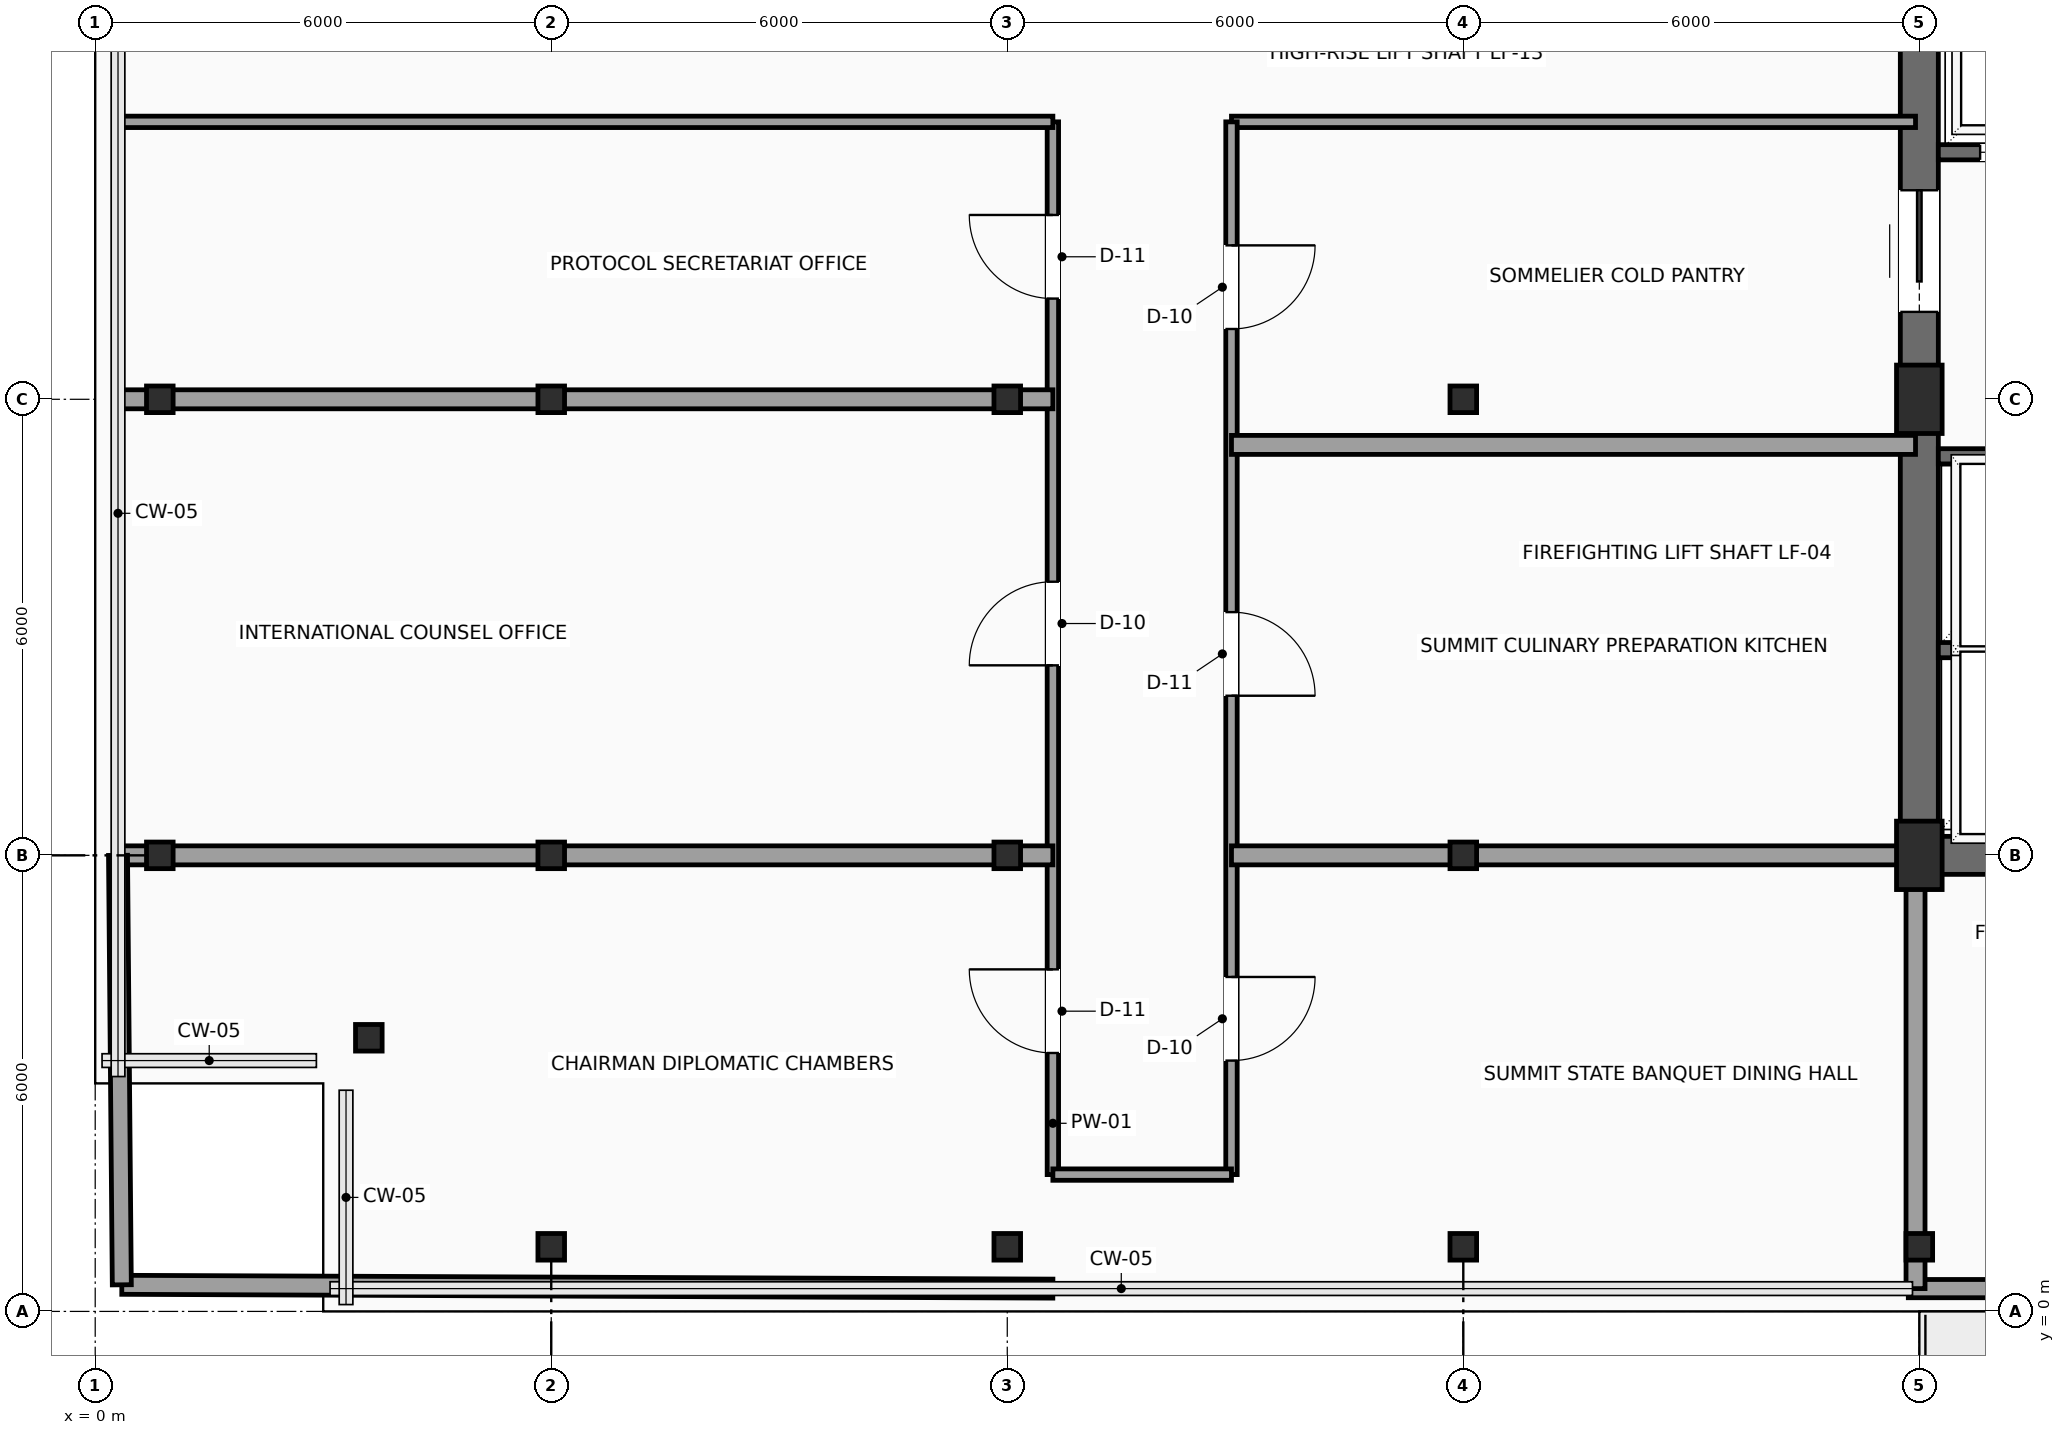
"""IFC4 building model, lengths in metres.
Left out: names, types, materials, properties, quantities, classifications, styles, units other than length and angle.
Written with IfcOpenShell. Run it as: python <this file> out.ifc"""

import sys

from ifc_helpers import new_model, si_unit, direction, frame, frame_2d, origin, origin_2d, place, context, subcontext, project, spatial, rectangle, hollow_rectangle, extrude, element, fill, save


model = new_model("IFC4")
c1 = context("Model", 3, precision=1e-05, world=origin(), true_north=direction((0.0, 1.0)))
c2 = subcontext(c1, "Body", "Model", "MODEL_VIEW")
j1 = project(units=[si_unit("LENGTHUNIT", "METRE"), si_unit("PLANEANGLEUNIT", "RADIAN")], contexts=[c1])
p1 = place(None, origin())
s1 = spatial("IfcSite", under=j1, at=p1, CompositionType="ELEMENT")
p2 = place(p1, origin())
s2 = spatial("IfcBuilding", under=s1, at=p2, CompositionType="ELEMENT")
p3 = place(p2, frame((0.0, 0.0, 285.2)))
s3 = spatial("IfcBuildingStorey", under=s2, at=p3, CompositionType="ELEMENT", Elevation=285.2)
for number, where, z_axis, x_axis in (
    (1, (24.0, 6.0, 0.0), (0.0, 0.0, 1.0), (1.0, 0.0, 0.0)),
    (2, (24.0, 12.0, 0.0), (0.0, 0.0, 1.0), (1.0, 0.0, 0.0)),
):
    element("IfcColumn", number, at=place(p3, frame(where, z_axis=z_axis, x_axis=x_axis)), inside=s3, PredefinedType="COLUMN", context=c2, shape_type="SweptSolid", body=[
        extrude(rectangle(XDim=0.6, YDim=0.9, at=origin_2d()), origin(), (0.0, 0.0, 1.0), 3.5),
    ])
for number, where, z_axis, x_axis in (
    (3, (3.6, 3.6, 0.0), (0.0, 0.0, 1.0), (1.0, 0.0, 0.0)),
    (4, (0.85, 6.0, 0.0), (0.0, 0.0, 1.0), (1.0, 0.0, 0.0)),
    (5, (0.85, 12.0, 0.0), (0.0, 0.0, 1.0), (1.0, 0.0, 0.0)),
    (6, (6.0, 0.85, 0.0), (0.0, 0.0, 1.0), (1.0, 0.0, 0.0)),
    (7, (6.0, 6.0, 0.0), (0.0, 0.0, 1.0), (1.0, 0.0, 0.0)),
    (8, (6.0, 12.0, 0.0), (0.0, 0.0, 1.0), (1.0, 0.0, 0.0)),
    (9, (12.0, 0.85, 0.0), (0.0, 0.0, 1.0), (1.0, 0.0, 0.0)),
    (10, (12.0, 6.0, 0.0), (0.0, 0.0, 1.0), (1.0, 0.0, 0.0)),
    (11, (12.0, 12.0, 0.0), (0.0, 0.0, 1.0), (1.0, 0.0, 0.0)),
    (12, (18.0, 0.85, 0.0), (0.0, 0.0, 1.0), (1.0, 0.0, 0.0)),
    (13, (18.0, 6.0, 0.0), (0.0, 0.0, 1.0), (1.0, 0.0, 0.0)),
    (14, (18.0, 12.0, 0.0), (0.0, 0.0, 1.0), (1.0, 0.0, 0.0)),
    (15, (24.0, 0.85, 0.0), (0.0, 0.0, 1.0), (1.0, 0.0, 0.0)),
):
    element("IfcColumn", number, at=place(p3, frame(where, z_axis=z_axis, x_axis=x_axis)), inside=s3, PredefinedType="COLUMN", context=c2, shape_type="SweptSolid", body=[
        extrude(hollow_rectangle(XDim=0.35, YDim=0.35, WallThickness=0.016, InnerFilletRadius=0.016, OuterFilletRadius=0.032, at=origin_2d()), origin(), (0.0, 0.0, 1.0), 3.5),
    ])
p4 = place(p3, frame((33.145, 0.3, 0.0), z_axis=(0.0, 0.0, 1.0), x_axis=(-1.0, 0.0, 0.0)))
e16 = element("IfcWall", 16, at=p4, inside=s3, PredefinedType="SOLIDWALL", context=c2, shape_type="SweptSolid", body=[
    extrude(rectangle(XDim=9.29, YDim=0.24, at=frame_2d((4.645, 0.0))), origin(), (0.0, 0.0, 1.0), 3.3),
])
p5 = place(p4, frame((3.945, 0.0, 0.0)))
e17 = element("IfcOpeningElement", 17, at=p5, cuts=e16, PredefinedType="OPENING", context=c2, shape_type="SweptSolid", body=[
    extrude(rectangle(XDim=1.05, YDim=2.2, at=frame_2d((0.525, 1.1))), frame((0.0, 0.13, 0.0), z_axis=(0.0, -1.0, 0.0), x_axis=(1.0, 0.0, 0.0)), (0.0, 0.0, 1.0), 0.26),
])
p6 = place(p4, frame((5.345, 0.0, 0.6)))
e18 = element("IfcOpeningElement", 18, at=p6, cuts=e16, PredefinedType="OPENING", context=c2, shape_type="SweptSolid", body=[
    extrude(rectangle(XDim=2.7, YDim=2.3, at=frame_2d((1.35, 1.15))), frame((0.0, 0.13, 0.0), z_axis=(0.0, -1.0, 0.0), x_axis=(1.0, 0.0, 0.0)), (0.0, 0.0, 1.0), 0.26),
])
p7 = place(p4, frame((1.4, 0.0, 0.6)))
e19 = element("IfcOpeningElement", 19, at=p7, cuts=e16, PredefinedType="OPENING", context=c2, shape_type="SweptSolid", body=[
    extrude(rectangle(XDim=0.9, YDim=2.2, at=frame_2d((0.45, 1.1))), frame((0.0, 0.13, 0.0), z_axis=(0.0, -1.0, 0.0), x_axis=(1.0, 0.0, 0.0)), (0.0, 0.0, 1.0), 0.26),
])
p8 = place(p3, frame((24.0, 6.0, 0.0), z_axis=(0.0, 0.0, 1.0), x_axis=(1.0, 0.0, 0.0)))
e20 = element("IfcWall", 20, at=p8, inside=s3, PredefinedType="SHEAR", context=c2, shape_type="SweptSolid", body=[
    extrude(rectangle(XDim=9.6, YDim=0.5, at=frame_2d((4.8, 0.0))), origin(), (0.0, 0.0, 1.0), 3.3),
])
p9 = place(p3, frame((24.0, 6.0, 0.0), z_axis=(0.0, 0.0, 1.0), x_axis=(0.0, 1.0, 0.0)))
e21 = element("IfcWall", 21, at=p9, inside=s3, PredefinedType="SHEAR", context=c2, shape_type="SweptSolid", body=[
    extrude(rectangle(XDim=12.0, YDim=0.5, at=frame_2d((6.0, 0.0))), origin(), (0.0, 0.0, 1.0), 3.3),
])
p10 = place(p9, frame((7.15, 0.0, 0.0)))
e22 = element("IfcOpeningElement", 22, at=p10, cuts=e21, PredefinedType="OPENING", context=c2, shape_type="SweptSolid", body=[
    extrude(rectangle(XDim=1.6, YDim=2.3, at=frame_2d((0.8, 1.15))), frame((0.0, 0.26, 0.0), z_axis=(0.0, -1.0, 0.0), x_axis=(1.0, 0.0, 0.0)), (0.0, 0.0, 1.0), 0.52),
])
for number, where, z_axis, x_axis in (
    (23, (24.25, 8.7, 0.0), (0.0, 0.0, 1.0), (1.0, 0.0, 0.0)),
    (24, (24.25, 11.25, 0.0), (0.0, 0.0, 1.0), (1.0, 0.0, 0.0)),
):
    element("IfcWall", number, at=place(p3, frame(where, z_axis=z_axis, x_axis=x_axis)), inside=s3, PredefinedType="SHEAR", context=c2, shape_type="SweptSolid", body=[
        extrude(rectangle(XDim=2.17, YDim=0.2, at=frame_2d((1.085, 0.0))), origin(), (0.0, 0.0, 1.0), 3.3),
    ])
p11 = place(p3, frame((24.25, 15.25, 0.0), z_axis=(0.0, 0.0, 1.0), x_axis=(1.0, 0.0, 0.0)))
e25 = element("IfcWall", 25, at=p11, inside=s3, PredefinedType="SHEAR", context=c2, shape_type="SweptSolid", body=[
    extrude(rectangle(XDim=5.2, YDim=0.2, at=frame_2d((2.6, 0.0))), origin(), (0.0, 0.0, 1.0), 3.3),
])
p12 = place(p11, frame((0.55, 0.0, 0.0)))
e26 = element("IfcOpeningElement", 26, at=p12, cuts=e25, PredefinedType="OPENING", context=c2, shape_type="SweptSolid", body=[
    extrude(rectangle(XDim=1.2, YDim=2.2, at=frame_2d((0.6, 1.1))), frame((0.0, 0.11, 0.0), z_axis=(0.0, -1.0, 0.0), x_axis=(1.0, 0.0, 0.0)), (0.0, 0.0, 1.0), 0.22),
])
p13 = place(p11, frame((3.15, 0.0, 0.0)))
e27 = element("IfcOpeningElement", 27, at=p13, cuts=e25, PredefinedType="OPENING", context=c2, shape_type="SweptSolid", body=[
    extrude(rectangle(XDim=1.2, YDim=2.2, at=frame_2d((0.6, 1.1))), frame((0.0, 0.11, 0.0), z_axis=(0.0, -1.0, 0.0), x_axis=(1.0, 0.0, 0.0)), (0.0, 0.0, 1.0), 0.22),
])
p14 = place(p3, frame((12.6, 1.8, 0.0), z_axis=(0.0, 0.0, 1.0), x_axis=(0.0, 1.0, 0.0)))
e28 = element("IfcWall", 28, at=p14, inside=s3, PredefinedType="PARTITIONING", context=c2, shape_type="SweptSolid", body=[
    extrude(rectangle(XDim=13.85, YDim=0.15, at=frame_2d((6.925, 0.0))), origin(), (0.0, 0.0, 1.0), 3.3),
])
p15 = place(p14, frame((1.6, 0.0, 0.0)))
e29 = element("IfcOpeningElement", 29, at=p15, cuts=e28, PredefinedType="OPENING", context=c2, shape_type="SweptSolid", body=[
    extrude(rectangle(XDim=1.1, YDim=2.25, at=frame_2d((0.55, 1.125))), frame((0.0, 0.085, 0.0), z_axis=(0.0, -1.0, 0.0), x_axis=(1.0, 0.0, 0.0)), (0.0, 0.0, 1.0), 0.17),
])
p16 = place(p14, frame((6.7, 0.0, 0.0)))
e30 = element("IfcOpeningElement", 30, at=p16, cuts=e28, PredefinedType="OPENING", context=c2, shape_type="SweptSolid", body=[
    extrude(rectangle(XDim=1.1, YDim=2.25, at=frame_2d((0.55, 1.125))), frame((0.0, 0.085, 0.0), z_axis=(0.0, -1.0, 0.0), x_axis=(1.0, 0.0, 0.0)), (0.0, 0.0, 1.0), 0.17),
])
p17 = place(p14, frame((11.525, 0.0, 0.0)))
e31 = element("IfcOpeningElement", 31, at=p17, cuts=e28, PredefinedType="OPENING", context=c2, shape_type="SweptSolid", body=[
    extrude(rectangle(XDim=1.1, YDim=2.25, at=frame_2d((0.55, 1.125))), frame((0.0, 0.085, 0.0), z_axis=(0.0, -1.0, 0.0), x_axis=(1.0, 0.0, 0.0)), (0.0, 0.0, 1.0), 0.17),
])
p18 = place(p3, frame((12.6, 15.65, 0.0), z_axis=(0.0, 0.0, 1.0), x_axis=(-1.0, 0.0, 0.0)))
e32 = element("IfcWall", 32, at=p18, inside=s3, PredefinedType="PARTITIONING", context=c2, shape_type="SweptSolid", body=[
    extrude(rectangle(XDim=12.3, YDim=0.15, at=frame_2d((6.15, 0.0))), origin(), (0.0, 0.0, 1.0), 3.3),
])
p19 = place(p3, frame((23.95, 15.65, 0.0), z_axis=(0.0, 0.0, 1.0), x_axis=(-1.0, 0.0, 0.0)))
e33 = element("IfcWall", 33, at=p19, inside=s3, PredefinedType="PARTITIONING", context=c2, shape_type="SweptSolid", body=[
    extrude(rectangle(XDim=9.0, YDim=0.15, at=frame_2d((4.5, 0.0))), origin(), (0.0, 0.0, 1.0), 3.3),
])
p20 = place(p3, frame((14.95, 15.65, 0.0), z_axis=(0.0, 0.0, 1.0), x_axis=(0.0, -1.0, 0.0)))
e34 = element("IfcWall", 34, at=p20, inside=s3, PredefinedType="PARTITIONING", context=c2, shape_type="SweptSolid", body=[
    extrude(rectangle(XDim=13.85, YDim=0.15, at=frame_2d((6.925, 0.0))), origin(), (0.0, 0.0, 1.0), 3.3),
])
p21 = place(p20, frame((11.25, 0.0, 0.0)))
e35 = element("IfcOpeningElement", 35, at=p21, cuts=e34, PredefinedType="OPENING", context=c2, shape_type="SweptSolid", body=[
    extrude(rectangle(XDim=1.1, YDim=2.25, at=frame_2d((0.55, 1.125))), frame((0.0, 0.085, 0.0), z_axis=(0.0, -1.0, 0.0), x_axis=(1.0, 0.0, 0.0)), (0.0, 0.0, 1.0), 0.17),
])
p22 = place(p20, frame((6.45, 0.0, 0.0)))
e36 = element("IfcOpeningElement", 36, at=p22, cuts=e34, PredefinedType="OPENING", context=c2, shape_type="SweptSolid", body=[
    extrude(rectangle(XDim=1.1, YDim=2.25, at=frame_2d((0.55, 1.125))), frame((0.0, 0.085, 0.0), z_axis=(0.0, -1.0, 0.0), x_axis=(1.0, 0.0, 0.0)), (0.0, 0.0, 1.0), 0.17),
])
p23 = place(p20, frame((1.625, 0.0, 0.0)))
e37 = element("IfcOpeningElement", 37, at=p23, cuts=e34, PredefinedType="OPENING", context=c2, shape_type="SweptSolid", body=[
    extrude(rectangle(XDim=1.1, YDim=2.25, at=frame_2d((0.55, 1.125))), frame((0.0, 0.085, 0.0), z_axis=(0.0, -1.0, 0.0), x_axis=(1.0, 0.0, 0.0)), (0.0, 0.0, 1.0), 0.17),
])
p24 = place(p3, frame((14.95, 1.8, 0.0), z_axis=(0.0, 0.0, 1.0), x_axis=(-1.0, 0.0, 0.0)))
e38 = element("IfcWall", 38, at=p24, inside=s3, PredefinedType="PARTITIONING", context=c2, shape_type="SweptSolid", body=[
    extrude(rectangle(XDim=2.35, YDim=0.15, at=frame_2d((1.175, 0.0))), origin(), (0.0, 0.0, 1.0), 3.3),
])
p25 = place(p3, frame((0.35, 0.35, 0.0), z_axis=(0.0, 0.0, 1.0), x_axis=(0.999991653965, -0.004085584524, 0.0)))
e39 = element("IfcWall", 39, at=p25, inside=s3, PredefinedType="PARTITIONING", context=c2, shape_type="SweptSolid", body=[
    extrude(rectangle(XDim=12.25, YDim=0.25, at=frame_2d((6.125, 0.0))), origin(), (0.0, 0.0, 1.0), 3.3),
])
p26 = place(p3, frame((0.3, 6.0, 0.0), z_axis=(0.0, 0.0, 1.0), x_axis=(1.0, 0.0, 0.0)))
e40 = element("IfcWall", 40, at=p26, inside=s3, PredefinedType="PARTITIONING", context=c2, shape_type="SweptSolid", body=[
    extrude(rectangle(XDim=12.3, YDim=0.25, at=frame_2d((6.15, 0.0))), origin(), (0.0, 0.0, 1.0), 2.992),
])
p27 = place(p3, frame((0.35, 0.35, 0.0), z_axis=(0.0, 0.0, 1.0), x_axis=(-0.00885800524, 0.999960767102, 0.0)))
e41 = element("IfcWall", 41, at=p27, inside=s3, PredefinedType="PARTITIONING", context=c2, shape_type="SweptSolid", body=[
    extrude(rectangle(XDim=5.65, YDim=0.25, at=frame_2d((2.825, 0.0))), origin(), (0.0, 0.0, 1.0), 3.3),
])
p28 = place(p3, frame((0.3, 12.0, 0.0), z_axis=(0.0, 0.0, 1.0), x_axis=(1.0, 0.0, 0.0)))
e42 = element("IfcWall", 42, at=p28, inside=s3, PredefinedType="PARTITIONING", context=c2, shape_type="SweptSolid", body=[
    extrude(rectangle(XDim=12.3, YDim=0.25, at=frame_2d((6.15, 0.0))), origin(), (0.0, 0.0, 1.0), 2.992),
])
p29 = place(p3, frame((14.95, 6.0, 0.0), z_axis=(0.0, 0.0, 1.0), x_axis=(1.0, 0.0, 0.0)))
e43 = element("IfcWall", 43, at=p29, inside=s3, PredefinedType="PARTITIONING", context=c2, shape_type="SweptSolid", body=[
    extrude(rectangle(XDim=9.0, YDim=0.25, at=frame_2d((4.5, 0.0))), origin(), (0.0, 0.0, 1.0), 2.992),
])
p30 = place(p3, frame((23.95, 0.3, 0.0), z_axis=(0.0, 0.0, 1.0), x_axis=(0.0, 1.0, 0.0)))
e44 = element("IfcWall", 44, at=p30, inside=s3, PredefinedType="PARTITIONING", context=c2, shape_type="SweptSolid", body=[
    extrude(rectangle(XDim=5.7, YDim=0.25, at=frame_2d((2.85, 0.0))), origin(), (0.0, 0.0, 1.0), 2.967),
])
p31 = place(p3, frame((14.95, 11.4, 0.0), z_axis=(0.0, 0.0, 1.0), x_axis=(1.0, 0.0, 0.0)))
e45 = element("IfcWall", 45, at=p31, inside=s3, PredefinedType="PARTITIONING", context=c2, shape_type="SweptSolid", body=[
    extrude(rectangle(XDim=9.0, YDim=0.25, at=frame_2d((4.5, 0.0))), origin(), (0.0, 0.0, 1.0), 3.3),
])
p32 = place(p10, origin())
e46 = element("IfcDoor", 46, at=p32, inside=s3, OperationType="DOUBLE_DOOR_SLIDING", PredefinedType="DOOR", context=c2, shape_type="SweptSolid", body=[
    extrude(rectangle(XDim=1.6, YDim=2.3, at=frame_2d((0.8, 1.15))), frame((0.0, 0.025, 0.0), z_axis=(0.0, -1.0, 0.0), x_axis=(1.0, 0.0, 0.0)), (0.0, 0.0, 1.0), 0.05),
])
fill(e22, e46)
p33 = place(p12, origin())
e47 = element("IfcDoor", 47, at=p33, inside=s3, OperationType="SLIDING_TO_RIGHT", PredefinedType="DOOR", context=c2, shape_type="SweptSolid", body=[
    extrude(rectangle(XDim=1.2, YDim=2.2, at=frame_2d((0.6, 1.1))), frame((0.0, 0.025, 0.0), z_axis=(0.0, -1.0, 0.0), x_axis=(1.0, 0.0, 0.0)), (0.0, 0.0, 1.0), 0.05),
])
fill(e26, e47)
p34 = place(p15, origin())
e48 = element("IfcDoor", 48, at=p34, inside=s3, OperationType="SINGLE_SWING_RIGHT", PredefinedType="DOOR", context=c2, shape_type="SweptSolid", body=[
    extrude(rectangle(XDim=1.1, YDim=2.25, at=frame_2d((0.55, 1.125))), frame((0.0, 0.025, 0.0), z_axis=(0.0, -1.0, 0.0), x_axis=(1.0, 0.0, 0.0)), (0.0, 0.0, 1.0), 0.05),
])
fill(e29, e48)
p35 = place(p16, origin())
e49 = element("IfcDoor", 49, at=p35, inside=s3, OperationType="SINGLE_SWING_LEFT", PredefinedType="DOOR", context=c2, shape_type="SweptSolid", body=[
    extrude(rectangle(XDim=1.1, YDim=2.25, at=frame_2d((0.55, 1.125))), frame((0.0, 0.025, 0.0), z_axis=(0.0, -1.0, 0.0), x_axis=(1.0, 0.0, 0.0)), (0.0, 0.0, 1.0), 0.05),
])
fill(e30, e49)
p36 = place(p17, origin())
e50 = element("IfcDoor", 50, at=p36, inside=s3, OperationType="SINGLE_SWING_RIGHT", PredefinedType="DOOR", context=c2, shape_type="SweptSolid", body=[
    extrude(rectangle(XDim=1.1, YDim=2.25, at=frame_2d((0.55, 1.125))), frame((0.0, 0.025, 0.0), z_axis=(0.0, -1.0, 0.0), x_axis=(1.0, 0.0, 0.0)), (0.0, 0.0, 1.0), 0.05),
])
fill(e31, e50)
p37 = place(p21, origin())
e51 = element("IfcDoor", 51, at=p37, inside=s3, OperationType="SINGLE_SWING_LEFT", PredefinedType="DOOR", context=c2, shape_type="SweptSolid", body=[
    extrude(rectangle(XDim=1.1, YDim=2.25, at=frame_2d((0.55, 1.125))), frame((0.0, 0.025, 0.0), z_axis=(0.0, -1.0, 0.0), x_axis=(1.0, 0.0, 0.0)), (0.0, 0.0, 1.0), 0.05),
])
fill(e35, e51)
p38 = place(p22, origin())
e52 = element("IfcDoor", 52, at=p38, inside=s3, OperationType="SINGLE_SWING_RIGHT", PredefinedType="DOOR", context=c2, shape_type="SweptSolid", body=[
    extrude(rectangle(XDim=1.1, YDim=2.25, at=frame_2d((0.55, 1.125))), frame((0.0, 0.025, 0.0), z_axis=(0.0, -1.0, 0.0), x_axis=(1.0, 0.0, 0.0)), (0.0, 0.0, 1.0), 0.05),
])
fill(e36, e52)
p39 = place(p23, origin())
e53 = element("IfcDoor", 53, at=p39, inside=s3, OperationType="SINGLE_SWING_LEFT", PredefinedType="DOOR", context=c2, shape_type="SweptSolid", body=[
    extrude(rectangle(XDim=1.1, YDim=2.25, at=frame_2d((0.55, 1.125))), frame((0.0, 0.025, 0.0), z_axis=(0.0, -1.0, 0.0), x_axis=(1.0, 0.0, 0.0)), (0.0, 0.0, 1.0), 0.05),
])
fill(e37, e53)
save(model, sys.argv[1])
